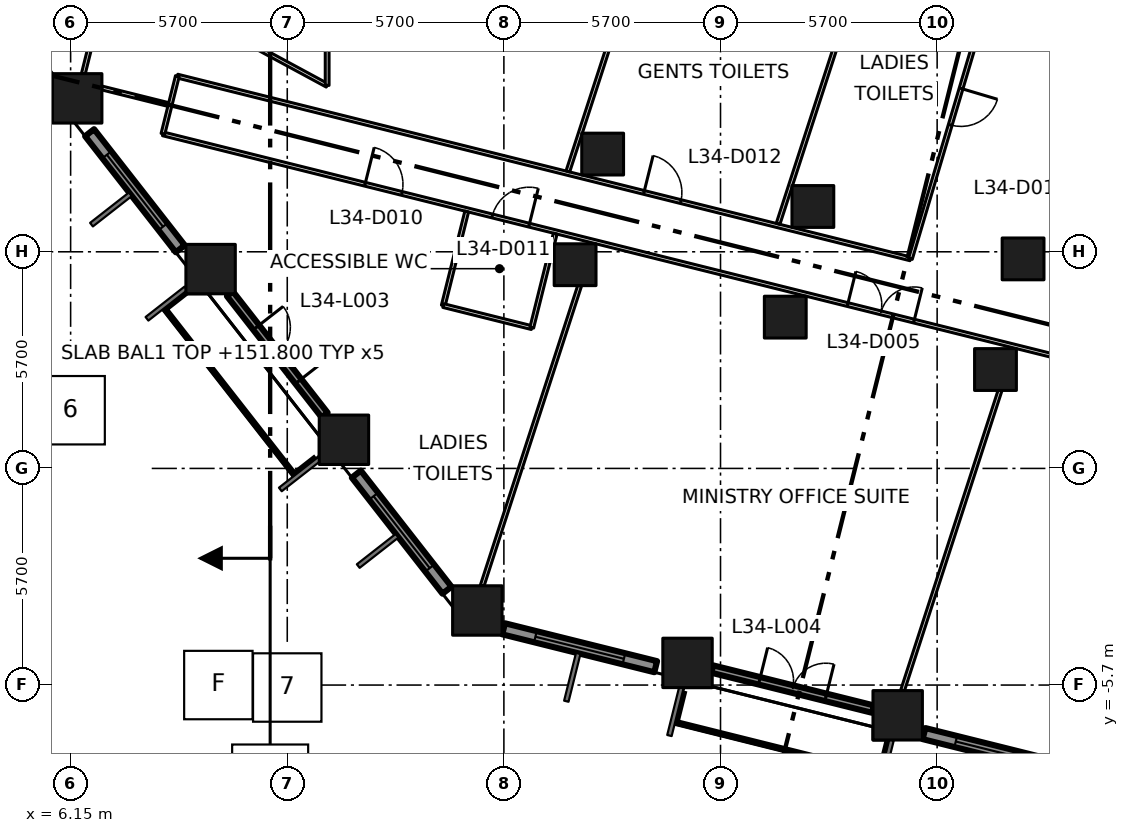
"""IFC4 building model, lengths in metres.
Left out: names, types, materials, properties, quantities, classifications, styles, units other than length and angle.
Written with IfcOpenShell. Run it as: python <this file> out.ifc"""

import sys

from ifc_helpers import new_model, si_unit, direction, frame, frame_2d, origin, origin_2d, place, context, subcontext, project, spatial, rectangle, extrude, element, fill, save


model = new_model("IFC4")
c1 = context("Model", 3, precision=1e-05, world=origin(), true_north=direction((0.0, 1.0)))
c2 = subcontext(c1, "Body", "Model", "MODEL_VIEW")
j1 = project(units=[si_unit("LENGTHUNIT", "METRE"), si_unit("PLANEANGLEUNIT", "RADIAN")], contexts=[c1])
p1 = place(None, origin())
s1 = spatial("IfcSite", under=j1, at=p1, CompositionType="ELEMENT")
p2 = place(p1, origin())
s2 = spatial("IfcBuilding", under=s1, at=p2, CompositionType="ELEMENT")
p3 = place(p2, frame((0.0, 0.0, 151.8)))
s3 = spatial("IfcBuildingStorey", under=s2, at=p3, CompositionType="ELEMENT", Elevation=151.8)
for number, where, z_axis, x_axis in (
    (1, (16.851, -3.738, 0.0), (0.0, 0.0, 1.0), (1.0, 0.0, 0.0)),
    (2, (13.342, 0.754, 0.0), (0.0, 0.0, 1.0), (1.0, 0.0, 0.0)),
    (3, (9.833, 5.245, 0.0), (0.0, 0.0, 1.0), (1.0, 0.0, 0.0)),
    (4, (6.323, 9.737, 0.0), (0.0, 0.0, 1.0), (1.0, 0.0, 0.0)),
    (5, (22.382, -5.117, 0.0), (0.0, 0.0, 1.0), (1.0, 0.0, 0.0)),
    (6, (27.912, -6.496, 0.0), (0.0, 0.0, 1.0), (1.0, 0.0, 0.0)),
):
    element("IfcColumn", number, at=place(p3, frame(where, z_axis=z_axis, x_axis=x_axis)), inside=s3, PredefinedType="COLUMN", context=c2, shape_type="SweptSolid", body=[
        extrude(rectangle(XDim=1.3, YDim=1.3, at=origin_2d()), origin(), (0.0, 0.0, 1.0), 4.2),
    ])
for number, where, z_axis, x_axis in (
    (7, (19.424, 5.36, 0.0), (0.0, 0.0, 1.0), (1.0, 0.0, 0.0)),
    (8, (24.954, 3.981, 0.0), (0.0, 0.0, 1.0), (1.0, 0.0, 0.0)),
    (9, (30.485, 2.602, 0.0), (0.0, 0.0, 1.0), (1.0, 0.0, 0.0)),
    (10, (20.149, 8.271, 0.0), (0.0, 0.0, 1.0), (1.0, 0.0, 0.0)),
    (11, (25.68, 6.892, 0.0), (0.0, 0.0, 1.0), (1.0, 0.0, 0.0)),
    (12, (31.211, 5.513, 0.0), (0.0, 0.0, 1.0), (1.0, 0.0, 0.0)),
):
    element("IfcColumn", number, at=place(p3, frame(where, z_axis=z_axis, x_axis=x_axis)), inside=s3, PredefinedType="COLUMN", context=c2, shape_type="SweptSolid", body=[
        extrude(rectangle(XDim=1.1, YDim=1.1, at=origin_2d()), origin(), (0.0, 0.0, 1.0), 4.2),
    ])
p4 = place(p3, frame((6.649, 8.834, 0.0), z_axis=(0.0, 0.0, 1.0), x_axis=(0.615535257281, -0.788109349674, 0.0)))
e13 = element("IfcWall", 13, at=p4, inside=s3, PredefinedType="SOLIDWALL", context=c2, shape_type="SweptSolid", body=[
    extrude(rectangle(XDim=3.876, YDim=0.3, at=frame_2d((1.938, 0.0))), origin(), (0.0, 0.0, 1.0), 2.95),
])
p5 = place(p4, frame((0.738, 0.0, 0.8)))
e14 = element("IfcOpeningElement", 14, at=p5, cuts=e13, PredefinedType="OPENING", context=c2, shape_type="SweptSolid", body=[
    extrude(rectangle(XDim=2.4, YDim=1.45, at=frame_2d((1.2, 0.725))), frame((0.0, 0.16, 0.0), z_axis=(0.0, -1.0, 0.0), x_axis=(1.0, 0.0, 0.0)), (0.0, 0.0, 1.0), 0.32),
])
p6 = place(p3, frame((10.341, 4.595, 0.0), z_axis=(0.0, 0.0, 1.0), x_axis=(0.615646382005, -0.788022545569, 0.0)))
e15 = element("IfcWall", 15, at=p6, inside=s3, PredefinedType="SOLIDWALL", context=c2, shape_type="SweptSolid", body=[
    extrude(rectangle(XDim=4.049, YDim=0.2, at=frame_2d((2.025, 0.0))), origin(), (0.0, 0.0, 1.0), 2.95),
])
p7 = place(p6, frame((1.124, 0.0, 0.0)))
e16 = element("IfcOpeningElement", 16, at=p7, cuts=e15, PredefinedType="OPENING", context=c2, shape_type="SweptSolid", body=[
    extrude(rectangle(XDim=1.8, YDim=2.9, at=frame_2d((0.9, 1.45))), frame((0.0, 0.11, 0.0), z_axis=(0.0, -1.0, 0.0), x_axis=(1.0, 0.0, 0.0)), (0.0, 0.0, 1.0), 0.22),
])
p8 = place(p3, frame((8.89, 4.292, 0.0), z_axis=(0.0, 0.0, 1.0), x_axis=(0.615636085037, -0.788030590016, 0.0)))
e17 = element("IfcWall", 17, at=p8, inside=s3, PredefinedType="SOLIDWALL", context=c2, shape_type="SweptSolid", body=[
    extrude(rectangle(XDim=5.359, YDim=0.4, at=frame_2d((2.679, 0.0))), origin(), (0.0, 0.0, 1.0), 0.3),
])
p9 = place(p3, frame((13.667, -0.15, 0.0), z_axis=(0.0, 0.0, 1.0), x_axis=(0.615626928003, -0.788037743714, 0.0)))
e18 = element("IfcWall", 18, at=p9, inside=s3, PredefinedType="SOLIDWALL", context=c2, shape_type="SweptSolid", body=[
    extrude(rectangle(XDim=3.876, YDim=0.3, at=frame_2d((1.938, 0.0))), origin(), (0.0, 0.0, 1.0), 2.95),
])
p10 = place(p9, frame((0.738, 0.0, 0.8)))
e19 = element("IfcOpeningElement", 19, at=p10, cuts=e18, PredefinedType="OPENING", context=c2, shape_type="SweptSolid", body=[
    extrude(rectangle(XDim=2.4, YDim=1.45, at=frame_2d((1.2, 0.725))), frame((0.0, 0.16, 0.0), z_axis=(0.0, -1.0, 0.0), x_axis=(1.0, 0.0, 0.0)), (0.0, 0.0, 1.0), 0.32),
])
p11 = place(p3, frame((17.543, -4.22, 0.0), z_axis=(0.0, 0.0, 1.0), x_axis=(0.970337184445, -0.241755555227, 0.0)))
e20 = element("IfcWall", 20, at=p11, inside=s3, PredefinedType="SOLIDWALL", context=c2, shape_type="SweptSolid", body=[
    extrude(rectangle(XDim=4.124, YDim=0.3, at=frame_2d((2.062, 0.0))), origin(), (0.0, 0.0, 1.0), 2.95),
])
p12 = place(p11, frame((0.862, 0.0, 0.8)))
e21 = element("IfcOpeningElement", 21, at=p12, cuts=e20, PredefinedType="OPENING", context=c2, shape_type="SweptSolid", body=[
    extrude(rectangle(XDim=2.4, YDim=1.45, at=frame_2d((1.2, 0.725))), frame((0.0, 0.16, 0.0), z_axis=(0.0, -1.0, 0.0), x_axis=(1.0, 0.0, 0.0)), (0.0, 0.0, 1.0), 0.32),
])
p13 = place(p3, frame((23.032, -5.279, 0.0), z_axis=(0.0, 0.0, 1.0), x_axis=(0.970333273122, -0.241771253611, 0.0)))
e22 = element("IfcWall", 22, at=p13, inside=s3, PredefinedType="SOLIDWALL", context=c2, shape_type="SweptSolid", body=[
    extrude(rectangle(XDim=4.359, YDim=0.2, at=frame_2d((2.18, 0.0))), origin(), (0.0, 0.0, 1.0), 2.95),
])
p14 = place(p13, frame((1.279, 0.0, 0.0)))
e23 = element("IfcOpeningElement", 23, at=p14, cuts=e22, PredefinedType="OPENING", context=c2, shape_type="SweptSolid", body=[
    extrude(rectangle(XDim=1.8, YDim=2.9, at=frame_2d((0.9, 1.45))), frame((0.0, 0.11, 0.0), z_axis=(0.0, -1.0, 0.0), x_axis=(1.0, 0.0, 0.0)), (0.0, 0.0, 1.0), 0.22),
])
p15 = place(p3, frame((22.225, -6.448, 0.0), z_axis=(0.0, 0.0, 1.0), x_axis=(0.970268314528, -0.242031811592, 0.0)))
e24 = element("IfcWall", 24, at=p15, inside=s3, PredefinedType="SOLIDWALL", context=c2, shape_type="SweptSolid", body=[
    extrude(rectangle(XDim=5.359, YDim=0.4, at=frame_2d((2.68, 0.0))), origin(), (0.0, 0.0, 1.0), 0.3),
])
p16 = place(p3, frame((28.604, -6.977, 0.0), z_axis=(0.0, 0.0, 1.0), x_axis=(0.970281616392, -0.241978480223, 0.0)))
e25 = element("IfcWall", 25, at=p16, inside=s3, PredefinedType="SOLIDWALL", context=c2, shape_type="SweptSolid", body=[
    extrude(rectangle(XDim=4.125, YDim=0.3, at=frame_2d((2.062, 0.0))), origin(), (0.0, 0.0, 1.0), 2.95),
])
p17 = place(p16, frame((0.862, 0.0, 0.8)))
e26 = element("IfcOpeningElement", 26, at=p17, cuts=e25, PredefinedType="OPENING", context=c2, shape_type="SweptSolid", body=[
    extrude(rectangle(XDim=2.4, YDim=1.45, at=frame_2d((1.2, 0.725))), frame((0.0, 0.16, 0.0), z_axis=(0.0, -1.0, 0.0), x_axis=(1.0, 0.0, 0.0)), (0.0, 0.0, 1.0), 0.32),
])
p18 = place(p3, frame((8.579, 8.803, 0.0), z_axis=(0.0, 0.0, 1.0), x_axis=(0.970298569476, -0.241910491863, 0.0)))
e27 = element("IfcWall", 27, at=p18, inside=s3, PredefinedType="PARTITIONING", context=c2, shape_type="SweptSolid", body=[
    extrude(rectangle(XDim=62.676, YDim=0.1, at=frame_2d((31.338, 0.0))), origin(), (0.0, 0.0, 1.0), 3.75),
])
p19 = place(p18, frame((36.566, 0.0, 0.0)))
e28 = element("IfcOpeningElement", 28, at=p19, cuts=e27, PredefinedType="OPENING", context=c2, shape_type="SweptSolid", body=[
    extrude(rectangle(XDim=1.8, YDim=2.1, at=frame_2d((0.9, 1.05))), frame((0.0, 0.06, 0.0), z_axis=(0.0, -1.0, 0.0), x_axis=(1.0, 0.0, 0.0)), (0.0, 0.0, 1.0), 0.12),
])
p20 = place(p18, frame((18.567, 0.0, 0.0)))
e29 = element("IfcOpeningElement", 29, at=p20, cuts=e27, PredefinedType="OPENING", context=c2, shape_type="SweptSolid", body=[
    extrude(rectangle(XDim=1.8, YDim=2.1, at=frame_2d((0.9, 1.05))), frame((0.0, 0.06, 0.0), z_axis=(0.0, -1.0, 0.0), x_axis=(1.0, 0.0, 0.0)), (0.0, 0.0, 1.0), 0.12),
])
p21 = place(p18, frame((31.966, 0.0, 0.0)))
e30 = element("IfcOpeningElement", 30, at=p21, cuts=e27, PredefinedType="OPENING", context=c2, shape_type="SweptSolid", body=[
    extrude(rectangle(XDim=1.0, YDim=2.1, at=frame_2d((0.5, 1.05))), frame((0.0, 0.06, 0.0), z_axis=(0.0, -1.0, 0.0), x_axis=(1.0, 0.0, 0.0)), (0.0, 0.0, 1.0), 0.12),
])
p22 = place(p18, frame((5.48, 0.0, 0.0)))
e31 = element("IfcOpeningElement", 31, at=p22, cuts=e27, PredefinedType="OPENING", context=c2, shape_type="SweptSolid", body=[
    extrude(rectangle(XDim=1.0, YDim=2.1, at=frame_2d((0.5, 1.05))), frame((0.0, 0.06, 0.0), z_axis=(0.0, -1.0, 0.0), x_axis=(1.0, 0.0, 0.0)), (0.0, 0.0, 1.0), 0.12),
])
p23 = place(p18, frame((8.93, 0.0, 0.0)))
e32 = element("IfcOpeningElement", 32, at=p23, cuts=e27, PredefinedType="OPENING", context=c2, shape_type="SweptSolid", body=[
    extrude(rectangle(XDim=1.0, YDim=2.1, at=frame_2d((0.5, 1.05))), frame((0.0, 0.06, 0.0), z_axis=(0.0, -1.0, 0.0), x_axis=(1.0, 0.0, 0.0)), (0.0, 0.0, 1.0), 0.12),
])
p24 = place(p3, frame((8.958, 10.323, 0.0), z_axis=(0.0, 0.0, 1.0), x_axis=(0.970298340477, -0.241911410372, 0.0)))
e33 = element("IfcWall", 33, at=p24, inside=s3, PredefinedType="PARTITIONING", context=c2, shape_type="SweptSolid", body=[
    extrude(rectangle(XDim=19.88, YDim=0.1, at=frame_2d((9.94, 0.0))), origin(), (0.0, 0.0, 1.0), 3.75),
])
p25 = place(p24, frame((12.653, 0.0, 0.0)))
e34 = element("IfcOpeningElement", 34, at=p25, cuts=e33, PredefinedType="OPENING", context=c2, shape_type="SweptSolid", body=[
    extrude(rectangle(XDim=1.0, YDim=2.1, at=frame_2d((0.5, 1.05))), frame((0.0, 0.06, 0.0), z_axis=(0.0, -1.0, 0.0), x_axis=(1.0, 0.0, 0.0)), (0.0, 0.0, 1.0), 0.12),
])
p26 = place(p3, frame((8.958, 10.323, 0.0), z_axis=(0.0, 0.0, 1.0), x_axis=(-0.241875508386, -0.97030729073, 0.0)))
e35 = element("IfcWall", 35, at=p26, inside=s3, PredefinedType="PARTITIONING", context=c2, shape_type="SweptSolid", body=[
    extrude(rectangle(XDim=1.567, YDim=0.1, at=frame_2d((0.783, 0.0))), origin(), (0.0, 0.0, 1.0), 3.75),
])
p27 = place(p3, frame((9.9, 11.7, 0.0), z_axis=(0.0, 0.0, 1.0), x_axis=(0.87965147249, -0.475618846291, 0.0)))
e36 = element("IfcWall", 36, at=p27, inside=s3, PredefinedType="PARTITIONING", context=c2, shape_type="SweptSolid", body=[
    extrude(rectangle(XDim=3.41, YDim=0.1, at=frame_2d((1.705, 0.0))), origin(), (0.0, 0.0, 1.0), 3.75),
])
p28 = place(p3, frame((12.9, 10.078, 0.0), z_axis=(0.0, 0.0, 1.0), x_axis=(0.0, 1.0, 0.0)))
e37 = element("IfcWall", 37, at=p28, inside=s3, PredefinedType="PARTITIONING", context=c2, shape_type="SweptSolid", body=[
    extrude(rectangle(XDim=4.022, YDim=0.1, at=frame_2d((2.011, 0.0))), origin(), (0.0, 0.0, 1.0), 3.75),
])
p29 = place(p28, frame((1.48, 0.0, 0.0)))
e38 = element("IfcOpeningElement", 38, at=p29, cuts=e37, PredefinedType="OPENING", context=c2, shape_type="SweptSolid", body=[
    extrude(rectangle(XDim=1.0, YDim=2.1, at=frame_2d((0.5, 1.05))), frame((0.0, 0.06, 0.0), z_axis=(0.0, -1.0, 0.0), x_axis=(1.0, 0.0, 0.0)), (0.0, 0.0, 1.0), 0.12),
])
p30 = place(p3, frame((30.8, 14.1, 0.0), z_axis=(0.0, 0.0, 1.0), x_axis=(-0.285004107837, -0.958526295162, 0.0)))
e39 = element("IfcWall", 39, at=p30, inside=s3, PredefinedType="PARTITIONING", context=c2, shape_type="SweptSolid", body=[
    extrude(rectangle(XDim=8.958, YDim=0.1, at=frame_2d((4.479, 0.0))), origin(), (0.0, 0.0, 1.0), 3.75),
])
p31 = place(p30, frame((4.28, 0.0, 0.0)))
e40 = element("IfcOpeningElement", 40, at=p31, cuts=e39, PredefinedType="OPENING", context=c2, shape_type="SweptSolid", body=[
    extrude(rectangle(XDim=1.0, YDim=2.1, at=frame_2d((0.5, 1.05))), frame((0.0, 0.06, 0.0), z_axis=(0.0, -1.0, 0.0), x_axis=(1.0, 0.0, 0.0)), (0.0, 0.0, 1.0), 0.12),
])
p32 = place(p3, frame((6.797, 11.638, 0.0), z_axis=(0.0, 0.0, 1.0), x_axis=(-0.242000927221, -0.970276018061, 0.0)))
e41 = element("IfcWall", 41, at=p32, inside=s3, PredefinedType="PARTITIONING", context=c2, shape_type="SweptSolid", body=[
    extrude(rectangle(XDim=1.289, YDim=0.1, at=frame_2d((0.645, 0.0))), origin(), (0.0, 0.0, 1.0), 3.75),
])
p33 = place(p3, frame((8.719, 9.575, 0.0), z_axis=(0.0, 0.0, 1.0), x_axis=(-0.970333736057, 0.241769395645, 0.0)))
e42 = element("IfcWall", 42, at=p33, inside=s3, PredefinedType="PARTITIONING", context=c2, shape_type="SweptSolid", body=[
    extrude(rectangle(XDim=1.8, YDim=0.1, at=frame_2d((0.9, 0.0))), origin(), (0.0, 0.0, 1.0), 3.75),
])
p34 = place(p3, frame((15.955, 4.285, 0.0), z_axis=(0.0, 0.0, 1.0), x_axis=(0.241949841323, 0.970288758197, 0.0)))
e43 = element("IfcWall", 43, at=p34, inside=s3, PredefinedType="PARTITIONING", context=c2, shape_type="SweptSolid", body=[
    extrude(rectangle(XDim=2.55, YDim=0.1, at=frame_2d((1.275, 0.0))), origin(), (0.0, 0.0, 1.0), 3.75),
])
p35 = place(p3, frame((16.978, -3.088, 0.0), z_axis=(0.0, 0.0, 1.0), x_axis=(0.308986355751, 0.951066470842, 0.0)))
e44 = element("IfcWall", 44, at=p35, inside=s3, PredefinedType="PARTITIONING", context=c2, shape_type="SweptSolid", body=[
    extrude(rectangle(XDim=8.304, YDim=0.1, at=frame_2d((4.152, 0.0))), origin(), (0.0, 0.0, 1.0), 3.75),
])
p36 = place(p3, frame((18.284, 3.704, 0.0), z_axis=(0.0, 0.0, 1.0), x_axis=(-0.970279961304, 0.241985116673, 0.0)))
e45 = element("IfcWall", 45, at=p36, inside=s3, PredefinedType="PARTITIONING", context=c2, shape_type="SweptSolid", body=[
    extrude(rectangle(XDim=2.4, YDim=0.1, at=frame_2d((1.2, 0.0))), origin(), (0.0, 0.0, 1.0), 3.75),
])
p37 = place(p3, frame((18.901, 6.178, 0.0), z_axis=(0.0, 0.0, 1.0), x_axis=(-0.241972320765, -0.970283152478, 0.0)))
e46 = element("IfcWall", 46, at=p37, inside=s3, PredefinedType="PARTITIONING", context=c2, shape_type="SweptSolid", body=[
    extrude(rectangle(XDim=2.55, YDim=0.1, at=frame_2d((1.275, 0.0))), origin(), (0.0, 0.0, 1.0), 3.75),
])
p38 = place(p3, frame((19.234, 7.816, 0.0), z_axis=(0.0, 0.0, 1.0), x_axis=(0.309035944139, 0.951050358935, 0.0)))
e47 = element("IfcWall", 47, at=p38, inside=s3, PredefinedType="PARTITIONING", context=c2, shape_type="SweptSolid", body=[
    extrude(rectangle(XDim=6.608, YDim=0.1, at=frame_2d((3.304, 0.0))), origin(), (0.0, 0.0, 1.0), 3.75),
])
p39 = place(p3, frame((24.765, 6.437, 0.0), z_axis=(0.0, 0.0, 1.0), x_axis=(0.309028520832, 0.951052771045, 0.0)))
e48 = element("IfcWall", 48, at=p39, inside=s3, PredefinedType="PARTITIONING", context=c2, shape_type="SweptSolid", body=[
    extrude(rectangle(XDim=8.057, YDim=0.1, at=frame_2d((4.029, 0.0))), origin(), (0.0, 0.0, 1.0), 3.75),
])
p40 = place(p3, frame((28.039, -5.846, 0.0), z_axis=(0.0, 0.0, 1.0), x_axis=(0.308986355751, 0.951066470842, 0.0)))
e49 = element("IfcWall", 49, at=p40, inside=s3, PredefinedType="PARTITIONING", context=c2, shape_type="SweptSolid", body=[
    extrude(rectangle(XDim=8.304, YDim=0.1, at=frame_2d((4.152, 0.0))), origin(), (0.0, 0.0, 1.0), 3.75),
])
p41 = place(p5, origin())
e50 = element("IfcWindow", 50, at=p41, inside=s3, PartitioningType="DOUBLE_PANEL_VERTICAL", PredefinedType="WINDOW", context=c2, shape_type="SweptSolid", body=[
    extrude(rectangle(XDim=2.4, YDim=1.45, at=frame_2d((1.2, 0.725))), frame((0.0, 0.03, 0.0), z_axis=(0.0, -1.0, 0.0), x_axis=(1.0, 0.0, 0.0)), (0.0, 0.0, 1.0), 0.06),
])
fill(e14, e50)
p42 = place(p7, origin())
e51 = element("IfcDoor", 51, at=p42, inside=s3, OperationType="DOUBLE_DOOR_SINGLE_SWING", PredefinedType="DOOR", context=c2, shape_type="SweptSolid", body=[
    extrude(rectangle(XDim=1.8, YDim=2.9, at=frame_2d((0.9, 1.45))), frame((0.0, 0.025, 0.0), z_axis=(0.0, -1.0, 0.0), x_axis=(1.0, 0.0, 0.0)), (0.0, 0.0, 1.0), 0.05),
])
fill(e16, e51)
p43 = place(p10, origin())
e52 = element("IfcWindow", 52, at=p43, inside=s3, PartitioningType="DOUBLE_PANEL_VERTICAL", PredefinedType="WINDOW", context=c2, shape_type="SweptSolid", body=[
    extrude(rectangle(XDim=2.4, YDim=1.45, at=frame_2d((1.2, 0.725))), frame((0.0, 0.03, 0.0), z_axis=(0.0, -1.0, 0.0), x_axis=(1.0, 0.0, 0.0)), (0.0, 0.0, 1.0), 0.06),
])
fill(e19, e52)
p44 = place(p12, origin())
e53 = element("IfcWindow", 53, at=p44, inside=s3, PartitioningType="DOUBLE_PANEL_VERTICAL", PredefinedType="WINDOW", context=c2, shape_type="SweptSolid", body=[
    extrude(rectangle(XDim=2.4, YDim=1.45, at=frame_2d((1.2, 0.725))), frame((0.0, 0.03, 0.0), z_axis=(0.0, -1.0, 0.0), x_axis=(1.0, 0.0, 0.0)), (0.0, 0.0, 1.0), 0.06),
])
fill(e21, e53)
p45 = place(p14, origin())
e54 = element("IfcDoor", 54, at=p45, inside=s3, OperationType="DOUBLE_DOOR_SINGLE_SWING", PredefinedType="DOOR", context=c2, shape_type="SweptSolid", body=[
    extrude(rectangle(XDim=1.8, YDim=2.9, at=frame_2d((0.9, 1.45))), frame((0.0, 0.025, 0.0), z_axis=(0.0, -1.0, 0.0), x_axis=(1.0, 0.0, 0.0)), (0.0, 0.0, 1.0), 0.05),
])
fill(e23, e54)
p46 = place(p17, origin())
e55 = element("IfcWindow", 55, at=p46, inside=s3, PartitioningType="DOUBLE_PANEL_VERTICAL", PredefinedType="WINDOW", context=c2, shape_type="SweptSolid", body=[
    extrude(rectangle(XDim=2.4, YDim=1.45, at=frame_2d((1.2, 0.725))), frame((0.0, 0.03, 0.0), z_axis=(0.0, -1.0, 0.0), x_axis=(1.0, 0.0, 0.0)), (0.0, 0.0, 1.0), 0.06),
])
fill(e26, e55)
p47 = place(p20, origin())
e56 = element("IfcDoor", 56, at=p47, inside=s3, OperationType="DOUBLE_DOOR_SINGLE_SWING", PredefinedType="DOOR", context=c2, shape_type="SweptSolid", body=[
    extrude(rectangle(XDim=1.8, YDim=2.1, at=frame_2d((0.9, 1.05))), frame((0.0, 0.025, 0.0), z_axis=(0.0, -1.0, 0.0), x_axis=(1.0, 0.0, 0.0)), (0.0, 0.0, 1.0), 0.05),
])
fill(e29, e56)
p48 = place(p22, origin())
e57 = element("IfcDoor", 57, at=p48, inside=s3, OperationType="SINGLE_SWING_LEFT", PredefinedType="DOOR", context=c2, shape_type="SweptSolid", body=[
    extrude(rectangle(XDim=1.0, YDim=2.1, at=frame_2d((0.5, 1.05))), frame((0.0, 0.025, 0.0), z_axis=(0.0, -1.0, 0.0), x_axis=(1.0, 0.0, 0.0)), (0.0, 0.0, 1.0), 0.05),
])
fill(e31, e57)
p49 = place(p23, origin())
e58 = element("IfcDoor", 58, at=p49, inside=s3, OperationType="SINGLE_SWING_RIGHT", PredefinedType="DOOR", context=c2, shape_type="SweptSolid", body=[
    extrude(rectangle(XDim=1.0, YDim=2.1, at=frame_2d((0.5, 1.05))), frame((0.0, 0.025, 0.0), z_axis=(0.0, -1.0, 0.0), x_axis=(1.0, 0.0, 0.0)), (0.0, 0.0, 1.0), 0.05),
])
fill(e32, e58)
p50 = place(p25, origin())
e59 = element("IfcDoor", 59, at=p50, inside=s3, OperationType="SINGLE_SWING_LEFT", PredefinedType="DOOR", context=c2, shape_type="SweptSolid", body=[
    extrude(rectangle(XDim=1.0, YDim=2.1, at=frame_2d((0.5, 1.05))), frame((0.0, 0.025, 0.0), z_axis=(0.0, -1.0, 0.0), x_axis=(1.0, 0.0, 0.0)), (0.0, 0.0, 1.0), 0.05),
])
fill(e34, e59)
p51 = place(p31, origin())
e60 = element("IfcDoor", 60, at=p51, inside=s3, OperationType="SINGLE_SWING_LEFT", PredefinedType="DOOR", context=c2, shape_type="SweptSolid", body=[
    extrude(rectangle(XDim=1.0, YDim=2.1, at=frame_2d((0.5, 1.05))), frame((0.0, 0.025, 0.0), z_axis=(0.0, -1.0, 0.0), x_axis=(1.0, 0.0, 0.0)), (0.0, 0.0, 1.0), 0.05),
])
fill(e40, e60)
save(model, sys.argv[1])
